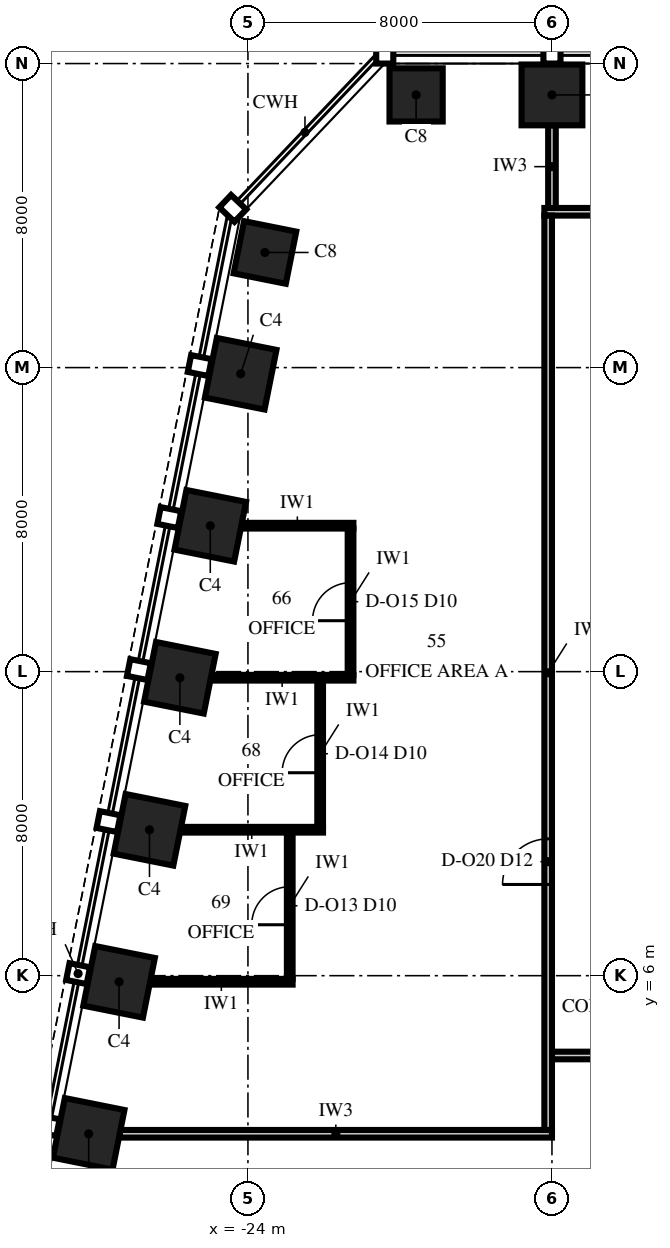
"""IFC4 building model, lengths in metres.
Left out: names, types, materials, properties, quantities, classifications, styles, units other than length and angle.
Written with IfcOpenShell. Run it as: python <this file> out.ifc"""

import sys

from ifc_helpers import new_model, si_unit, direction, frame, frame_2d, origin, origin_2d, place, context, subcontext, project, spatial, rectangle, extrude, element, fill, save


model = new_model("IFC4")
c1 = context("Model", 3, precision=1e-05, world=origin(), true_north=direction((0.0, 1.0)))
c2 = subcontext(c1, "Body", "Model", "MODEL_VIEW")
j1 = project(units=[si_unit("LENGTHUNIT", "METRE"), si_unit("PLANEANGLEUNIT", "RADIAN")], contexts=[c1])
p1 = place(None, origin())
s1 = spatial("IfcSite", under=j1, at=p1, CompositionType="ELEMENT")
p2 = place(p1, origin())
s2 = spatial("IfcBuilding", under=s1, at=p2, CompositionType="ELEMENT")
p3 = place(p2, frame((0.0, 0.0, 226.0)))
s3 = spatial("IfcBuildingStorey", under=s2, at=p3, CompositionType="ELEMENT", Elevation=226.0)
p4 = place(p3, frame((-16.0, 29.175, 0.0), z_axis=(0.0, 0.0, 1.0), x_axis=(-1.0, 0.0, 0.0)))
e1 = element("IfcColumn", 1, at=p4, inside=s3, PredefinedType="COLUMN", context=c2, shape_type="SweptSolid", body=[
    extrude(rectangle(XDim=1.6, YDim=1.6, at=origin_2d()), origin(), (0.0, 0.0, 1.0), 4.0),
])
for number, where, z_axis, x_axis in (
    (2, (-19.575, 29.175, 0.0), (0.0, 0.0, 1.0), (-1.0, 0.0, 0.0)),
    (3, (-23.553, 25.029, 0.0), (0.0, 0.0, 1.0), (-0.196, -0.981, 0.0)),
):
    element("IfcColumn", number, at=place(p3, frame(where, z_axis=z_axis, x_axis=x_axis)), inside=s3, PredefinedType="COLUMN", context=c2, shape_type="SweptSolid", body=[
        extrude(rectangle(XDim=1.4, YDim=1.4, at=origin_2d()), origin(), (0.0, 0.0, 1.0), 4.0),
    ])
for number, where, z_axis, x_axis in (
    (4, (-24.191, 21.838, 0.0), (0.0, 0.0, 1.0), (-0.196, -0.981, 0.0)),
    (5, (-24.991, 17.838, 0.0), (0.0, 0.0, 1.0), (-0.196, -0.981, 0.0)),
    (6, (-25.791, 13.838, 0.0), (0.0, 0.0, 1.0), (-0.196, -0.981, 0.0)),
    (7, (-26.591, 9.838, 0.0), (0.0, 0.0, 1.0), (-0.196, -0.981, 0.0)),
    (8, (-27.391, 5.838, 0.0), (0.0, 0.0, 1.0), (-0.196, -0.981, 0.0)),
    (9, (-28.191, 1.838, 0.0), (0.0, 0.0, 1.0), (-0.196, -0.981, 0.0)),
):
    element("IfcColumn", number, at=place(p3, frame(where, z_axis=z_axis, x_axis=x_axis)), inside=s3, PredefinedType="COLUMN", context=c2, shape_type="SweptSolid", body=[
        extrude(rectangle(XDim=1.6, YDim=1.6, at=origin_2d()), origin(), (0.0, 0.0, 1.0), 4.0),
    ])
p5 = place(p3, frame((-27.375, 1.84, 0.0), z_axis=(0.0, 0.0, 1.0), x_axis=(1.0, 0.0, 0.0)))
e10 = element("IfcWall", 10, at=p5, inside=s3, PredefinedType="PARTITIONING", context=c2, shape_type="SweptSolid", body=[
    extrude(rectangle(XDim=11.375, YDim=0.2, at=frame_2d((5.688, 0.0))), origin(), (0.0, 0.0, 1.0), 3.25),
])
p6 = place(p3, frame((-16.0, 3.9, 0.0), z_axis=(0.0, 0.0, 1.0), x_axis=(1.0, 0.0, 0.0)))
e11 = element("IfcWall", 11, at=p6, inside=s3, PredefinedType="PARTITIONING", context=c2, shape_type="SweptSolid", body=[
    extrude(rectangle(XDim=32.2, YDim=0.2, at=frame_2d((16.1, 0.0))), origin(), (0.0, 0.0, 1.0), 3.25),
])
p7 = place(p6, frame((5.4, 0.0, 0.0)))
e12 = element("IfcOpeningElement", 12, at=p7, cuts=e11, PredefinedType="OPENING", context=c2, shape_type="SweptSolid", body=[
    extrude(rectangle(XDim=1.2, YDim=2.4, at=frame_2d((0.6, 1.2))), frame((0.0, 0.115, 0.0), z_axis=(0.0, -1.0, 0.0), x_axis=(1.0, 0.0, 0.0)), (0.0, 0.0, 1.0), 0.23),
])
p8 = place(p6, frame((23.4, 0.0, 0.0)))
e13 = element("IfcOpeningElement", 13, at=p8, cuts=e11, PredefinedType="OPENING", context=c2, shape_type="SweptSolid", body=[
    extrude(rectangle(XDim=1.2, YDim=2.4, at=frame_2d((0.6, 1.2))), frame((0.0, 0.115, 0.0), z_axis=(0.0, -1.0, 0.0), x_axis=(1.0, 0.0, 0.0)), (0.0, 0.0, 1.0), 0.23),
])
p9 = place(p3, frame((-26.575, 5.84, 0.0), z_axis=(0.0, 0.0, 1.0), x_axis=(1.0, 0.0, 0.0)))
e14 = element("IfcWall", 14, at=p9, inside=s3, PredefinedType="PARTITIONING", context=c2, shape_type="SweptSolid", body=[
    extrude(rectangle(XDim=3.75, YDim=0.15, at=frame_2d((1.875, 0.0))), origin(), (0.0, 0.0, 1.0), 2.842),
])
p10 = place(p3, frame((-25.775, 9.84, 0.0), z_axis=(0.0, 0.0, 1.0), x_axis=(1.0, 0.0, 0.0)))
e15 = element("IfcWall", 15, at=p10, inside=s3, PredefinedType="PARTITIONING", context=c2, shape_type="SweptSolid", body=[
    extrude(rectangle(XDim=3.75, YDim=0.15, at=frame_2d((1.875, 0.0))), origin(), (0.0, 0.0, 1.0), 3.25),
])
p11 = place(p3, frame((-24.975, 13.84, 0.0), z_axis=(0.0, 0.0, 1.0), x_axis=(1.0, 0.0, 0.0)))
e16 = element("IfcWall", 16, at=p11, inside=s3, PredefinedType="PARTITIONING", context=c2, shape_type="SweptSolid", body=[
    extrude(rectangle(XDim=3.75, YDim=0.15, at=frame_2d((1.875, 0.0))), origin(), (0.0, 0.0, 1.0), 3.25),
])
p12 = place(p3, frame((-24.175, 17.84, 0.0), z_axis=(0.0, 0.0, 1.0), x_axis=(1.0, 0.0, 0.0)))
e17 = element("IfcWall", 17, at=p12, inside=s3, PredefinedType="PARTITIONING", context=c2, shape_type="SweptSolid", body=[
    extrude(rectangle(XDim=2.95, YDim=0.15, at=frame_2d((1.475, 0.0))), origin(), (0.0, 0.0, 1.0), 3.25),
])
p13 = place(p3, frame((-16.2, 26.1, 0.0), z_axis=(0.0, 0.0, 1.0), x_axis=(1.0, 0.0, 0.0)))
e18 = element("IfcWall", 18, at=p13, inside=s3, PredefinedType="PARTITIONING", context=c2, shape_type="SweptSolid", body=[
    extrude(rectangle(XDim=32.4, YDim=0.2, at=frame_2d((16.2, 0.0))), origin(), (0.0, 0.0, 1.0), 3.4),
])
p14 = place(p13, frame((3.6, 0.0, 0.0)))
e19 = element("IfcOpeningElement", 19, at=p14, cuts=e18, PredefinedType="OPENING", context=c2, shape_type="SweptSolid", body=[
    extrude(rectangle(XDim=1.2, YDim=2.4, at=frame_2d((0.6, 1.2))), frame((0.0, 0.115, 0.0), z_axis=(0.0, -1.0, 0.0), x_axis=(1.0, 0.0, 0.0)), (0.0, 0.0, 1.0), 0.23),
])
p15 = place(p13, frame((9.6, 0.0, 0.0)))
e20 = element("IfcOpeningElement", 20, at=p15, cuts=e18, PredefinedType="OPENING", context=c2, shape_type="SweptSolid", body=[
    extrude(rectangle(XDim=1.2, YDim=2.4, at=frame_2d((0.6, 1.2))), frame((0.0, 0.115, 0.0), z_axis=(0.0, -1.0, 0.0), x_axis=(1.0, 0.0, 0.0)), (0.0, 0.0, 1.0), 0.23),
])
p16 = place(p13, frame((13.6, 0.0, 0.0)))
e21 = element("IfcOpeningElement", 21, at=p16, cuts=e18, PredefinedType="OPENING", context=c2, shape_type="SweptSolid", body=[
    extrude(rectangle(XDim=1.2, YDim=2.4, at=frame_2d((0.6, 1.2))), frame((0.0, 0.115, 0.0), z_axis=(0.0, -1.0, 0.0), x_axis=(1.0, 0.0, 0.0)), (0.0, 0.0, 1.0), 0.23),
])
p17 = place(p13, frame((17.6, 0.0, 0.0)))
e22 = element("IfcOpeningElement", 22, at=p17, cuts=e18, PredefinedType="OPENING", context=c2, shape_type="SweptSolid", body=[
    extrude(rectangle(XDim=1.2, YDim=2.4, at=frame_2d((0.6, 1.2))), frame((0.0, 0.115, 0.0), z_axis=(0.0, -1.0, 0.0), x_axis=(1.0, 0.0, 0.0)), (0.0, 0.0, 1.0), 0.23),
])
p18 = place(p13, frame((23.6, 0.0, 0.0)))
e23 = element("IfcOpeningElement", 23, at=p18, cuts=e18, PredefinedType="OPENING", context=c2, shape_type="SweptSolid", body=[
    extrude(rectangle(XDim=1.2, YDim=2.4, at=frame_2d((0.6, 1.2))), frame((0.0, 0.115, 0.0), z_axis=(0.0, -1.0, 0.0), x_axis=(1.0, 0.0, 0.0)), (0.0, 0.0, 1.0), 0.23),
])
p19 = place(p13, frame((29.6, 0.0, 0.0)))
e24 = element("IfcOpeningElement", 24, at=p19, cuts=e18, PredefinedType="OPENING", context=c2, shape_type="SweptSolid", body=[
    extrude(rectangle(XDim=1.2, YDim=2.4, at=frame_2d((0.6, 1.2))), frame((0.0, 0.115, 0.0), z_axis=(0.0, -1.0, 0.0), x_axis=(1.0, 0.0, 0.0)), (0.0, 0.0, 1.0), 0.23),
])
p20 = place(p3, frame((-22.9, 5.915, 0.0), z_axis=(0.0, 0.0, 1.0), x_axis=(0.0, 1.0, 0.0)))
e25 = element("IfcWall", 25, at=p20, inside=s3, PredefinedType="PARTITIONING", context=c2, shape_type="SweptSolid", body=[
    extrude(rectangle(XDim=3.85, YDim=0.15, at=frame_2d((1.925, 0.0))), origin(), (0.0, 0.0, 1.0), 2.842),
])
p21 = place(p20, frame((1.425, 0.0, 0.0)))
e26 = element("IfcOpeningElement", 26, at=p21, cuts=e25, PredefinedType="OPENING", context=c2, shape_type="SweptSolid", body=[
    extrude(rectangle(XDim=1.0, YDim=2.3, at=frame_2d((0.5, 1.15))), frame((0.0, 0.09, 0.0), z_axis=(0.0, -1.0, 0.0), x_axis=(1.0, 0.0, 0.0)), (0.0, 0.0, 1.0), 0.18),
])
p22 = place(p3, frame((-22.1, 9.915, 0.0), z_axis=(0.0, 0.0, 1.0), x_axis=(0.0, 1.0, 0.0)))
e27 = element("IfcWall", 27, at=p22, inside=s3, PredefinedType="PARTITIONING", context=c2, shape_type="SweptSolid", body=[
    extrude(rectangle(XDim=3.85, YDim=0.15, at=frame_2d((1.925, 0.0))), origin(), (0.0, 0.0, 1.0), 3.85),
])
p23 = place(p22, frame((1.425, 0.0, 0.0)))
e28 = element("IfcOpeningElement", 28, at=p23, cuts=e27, PredefinedType="OPENING", context=c2, shape_type="SweptSolid", body=[
    extrude(rectangle(XDim=1.0, YDim=2.3, at=frame_2d((0.5, 1.15))), frame((0.0, 0.09, 0.0), z_axis=(0.0, -1.0, 0.0), x_axis=(1.0, 0.0, 0.0)), (0.0, 0.0, 1.0), 0.18),
])
p24 = place(p3, frame((-21.3, 13.915, 0.0), z_axis=(0.0, 0.0, 1.0), x_axis=(0.0, 1.0, 0.0)))
e29 = element("IfcWall", 29, at=p24, inside=s3, PredefinedType="PARTITIONING", context=c2, shape_type="SweptSolid", body=[
    extrude(rectangle(XDim=3.85, YDim=0.15, at=frame_2d((1.925, 0.0))), origin(), (0.0, 0.0, 1.0), 3.25),
])
p25 = place(p24, frame((1.425, 0.0, 0.0)))
e30 = element("IfcOpeningElement", 30, at=p25, cuts=e29, PredefinedType="OPENING", context=c2, shape_type="SweptSolid", body=[
    extrude(rectangle(XDim=1.0, YDim=2.3, at=frame_2d((0.5, 1.15))), frame((0.0, 0.09, 0.0), z_axis=(0.0, -1.0, 0.0), x_axis=(1.0, 0.0, 0.0)), (0.0, 0.0, 1.0), 0.18),
])
p26 = place(p3, frame((-16.1, 1.94, 0.0), z_axis=(0.0, 0.0, 1.0), x_axis=(0.0, 1.0, 0.0)))
e31 = element("IfcWall", 31, at=p26, inside=s3, PredefinedType="PARTITIONING", context=c2, shape_type="SweptSolid", body=[
    extrude(rectangle(XDim=24.06, YDim=0.2, at=frame_2d((12.03, 0.0))), origin(), (0.0, 0.0, 1.0), 2.842),
])
p27 = place(p26, frame((6.46, 0.0, 0.0)))
e32 = element("IfcOpeningElement", 32, at=p27, cuts=e31, PredefinedType="OPENING", context=c2, shape_type="SweptSolid", body=[
    extrude(rectangle(XDim=1.2, YDim=2.4, at=frame_2d((0.6, 1.2))), frame((0.0, 0.115, 0.0), z_axis=(0.0, -1.0, 0.0), x_axis=(1.0, 0.0, 0.0)), (0.0, 0.0, 1.0), 0.23),
])
p28 = place(p3, frame((-16.0, 26.2, 0.0), z_axis=(0.0, 0.0, 1.0), x_axis=(0.0, 1.0, 0.0)))
e33 = element("IfcWall", 33, at=p28, inside=s3, PredefinedType="PARTITIONING", context=c2, shape_type="SweptSolid", body=[
    extrude(rectangle(XDim=2.175, YDim=0.2, at=frame_2d((1.087, 0.0))), origin(), (0.0, 0.0, 1.0), 3.4),
])
p29 = place(p21, origin())
e34 = element("IfcDoor", 34, at=p29, inside=s3, OperationType="SINGLE_SWING_LEFT", PredefinedType="DOOR", context=c2, shape_type="SweptSolid", body=[
    extrude(rectangle(XDim=1.0, YDim=2.3, at=frame_2d((0.5, 1.15))), frame((0.0, 0.075, 0.0), z_axis=(0.0, -1.0, 0.0), x_axis=(1.0, 0.0, 0.0)), (0.0, 0.0, 1.0), 0.149),
])
fill(e26, e34)
p30 = place(p23, origin())
e35 = element("IfcDoor", 35, at=p30, inside=s3, OperationType="SINGLE_SWING_LEFT", PredefinedType="DOOR", context=c2, shape_type="SweptSolid", body=[
    extrude(rectangle(XDim=1.0, YDim=2.3, at=frame_2d((0.5, 1.15))), frame((0.0, 0.075, 0.0), z_axis=(0.0, -1.0, 0.0), x_axis=(1.0, 0.0, 0.0)), (0.0, 0.0, 1.0), 0.149),
])
fill(e28, e35)
p31 = place(p25, origin())
e36 = element("IfcDoor", 36, at=p31, inside=s3, OperationType="SINGLE_SWING_LEFT", PredefinedType="DOOR", context=c2, shape_type="SweptSolid", body=[
    extrude(rectangle(XDim=1.0, YDim=2.3, at=frame_2d((0.5, 1.15))), frame((0.0, 0.075, 0.0), z_axis=(0.0, -1.0, 0.0), x_axis=(1.0, 0.0, 0.0)), (0.0, 0.0, 1.0), 0.149),
])
fill(e30, e36)
p32 = place(p27, origin())
e37 = element("IfcDoor", 37, at=p32, inside=s3, OperationType="SINGLE_SWING_LEFT", PredefinedType="DOOR", context=c2, shape_type="SweptSolid", body=[
    extrude(rectangle(XDim=1.2, YDim=2.4, at=frame_2d((0.6, 1.2))), frame((0.0, 0.1, 0.0), z_axis=(0.0, -1.0, 0.0), x_axis=(1.0, 0.0, 0.0)), (0.0, 0.0, 1.0), 0.199),
])
fill(e32, e37)
save(model, sys.argv[1])
